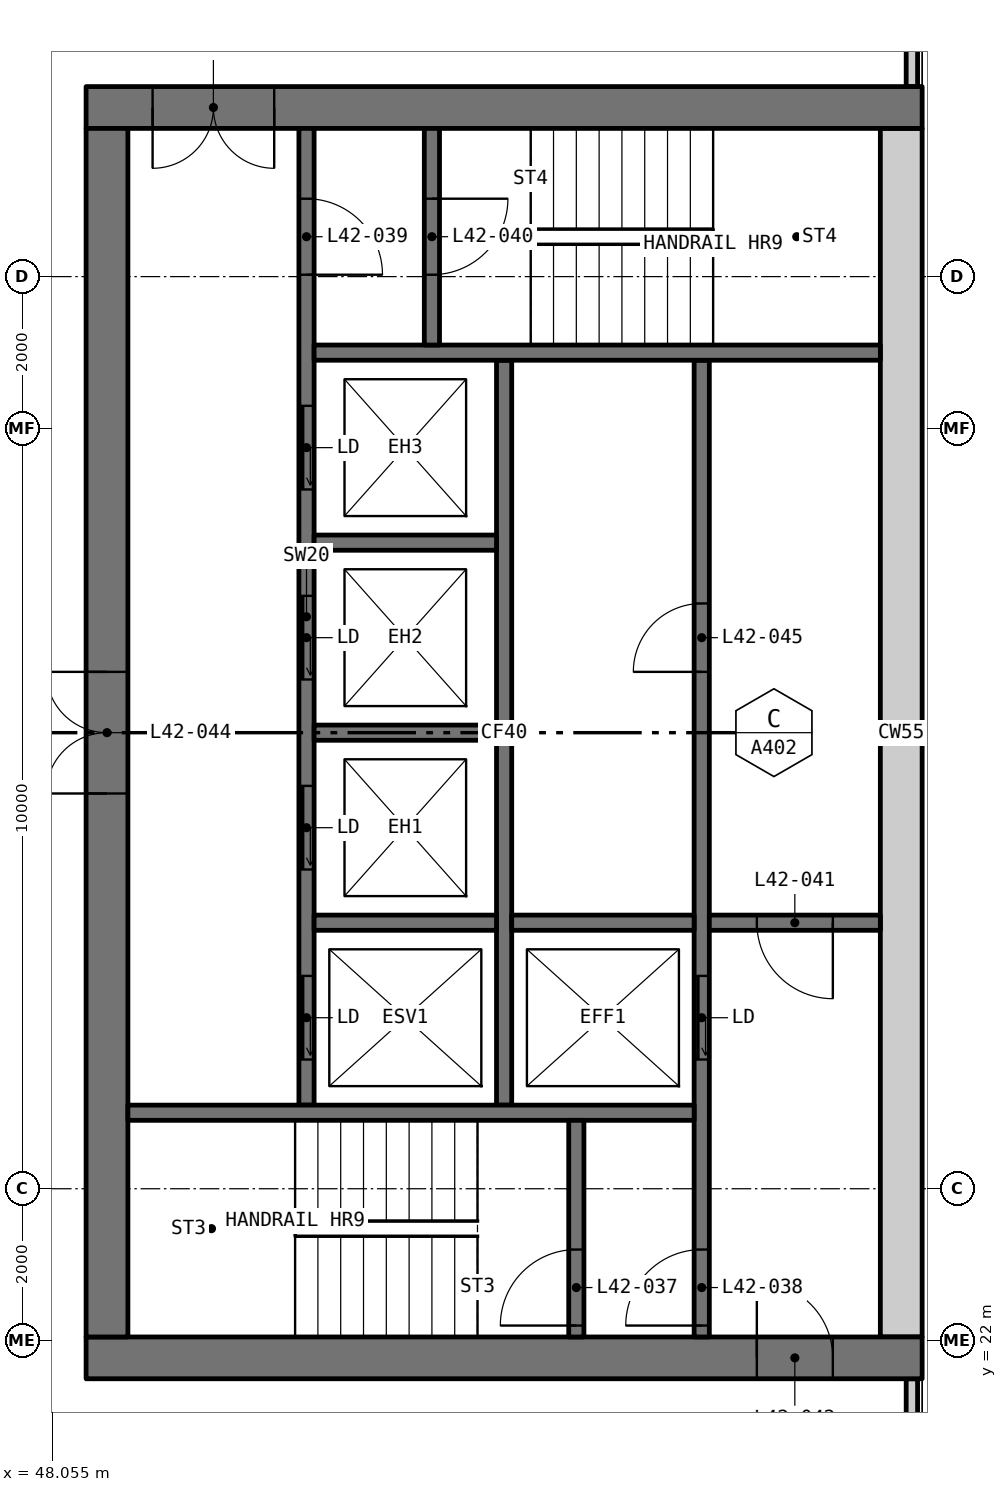
"""IFC4 building model, lengths in metres.
Left out: names, types, materials, properties, quantities, classifications, styles, units other than length and angle.
Written with IfcOpenShell. Run it as: python <this file> out.ifc"""

import sys

from ifc_helpers import new_model, si_unit, direction, frame, frame_2d, origin, place, context, subcontext, project, spatial, rectangle, extrude, element, fill, save


model = new_model("IFC4")
c1 = context("Model", 3, precision=1e-05, world=origin(), true_north=direction((0.0, 1.0)))
c2 = subcontext(c1, "Body", "Model", "MODEL_VIEW")
j1 = project(units=[si_unit("LENGTHUNIT", "METRE"), si_unit("PLANEANGLEUNIT", "RADIAN")], contexts=[c1])
p1 = place(None, origin())
s1 = spatial("IfcSite", under=j1, at=p1, CompositionType="ELEMENT")
p2 = place(p1, origin())
s2 = spatial("IfcBuilding", under=s1, at=p2, CompositionType="ELEMENT")
p3 = place(p2, frame((0.0, 0.0, 161.7)))
s3 = spatial("IfcBuildingStorey", under=s2, at=p3, CompositionType="ELEMENT", Elevation=161.7)
for number, where, z_axis, x_axis in (
    (1, (59.365, 18.71, 0.0), (0.0, 0.0, 1.0), (0.0, 1.0, 0.0)),
    (2, (59.365, 38.5, 0.0), (0.0, 0.0, 1.0), (0.0, 1.0, 0.0)),
):
    element("IfcWall", number, at=place(p3, frame(where, z_axis=z_axis, x_axis=x_axis)), inside=s3, PredefinedType="ELEMENTEDWALL", context=c2, shape_type="SweptSolid", body=[
        extrude(rectangle(XDim=2.79, YDim=0.15, at=frame_2d((1.395, 0.0))), origin(), (0.0, 0.0, 1.0), 3.05),
    ])
p4 = place(p3, frame((59.5, 21.775, 0.0), z_axis=(0.0, 0.0, 1.0), x_axis=(-1.0, 0.0, 0.0)))
e3 = element("IfcWall", 3, at=p4, inside=s3, PredefinedType="SHEAR", context=c2, shape_type="SweptSolid", body=[
    extrude(rectangle(XDim=11.0, YDim=0.55, at=frame_2d((5.5, 0.0))), origin(), (0.0, 0.0, 1.0), 3.05),
])
p5 = place(p4, frame((1.175, 0.0, 0.0)))
e4 = element("IfcOpeningElement", 4, at=p5, cuts=e3, PredefinedType="OPENING", context=c2, shape_type="SweptSolid", body=[
    extrude(rectangle(XDim=1.0, YDim=2.1, at=frame_2d((0.5, 1.05))), frame((0.0, 0.285, 0.0), z_axis=(0.0, -1.0, 0.0), x_axis=(1.0, 0.0, 0.0)), (0.0, 0.0, 1.0), 0.57),
])
p6 = place(p3, frame((59.5, 38.225, 0.0), z_axis=(0.0, 0.0, 1.0), x_axis=(-1.0, 0.0, 0.0)))
e5 = element("IfcWall", 5, at=p6, inside=s3, PredefinedType="SHEAR", context=c2, shape_type="SweptSolid", body=[
    extrude(rectangle(XDim=11.0, YDim=0.55, at=frame_2d((5.5, 0.0))), origin(), (0.0, 0.0, 1.0), 3.05),
])
p7 = place(p6, frame((8.525, 0.0, 0.0)))
e6 = element("IfcOpeningElement", 6, at=p7, cuts=e5, PredefinedType="OPENING", context=c2, shape_type="SweptSolid", body=[
    extrude(rectangle(XDim=1.6, YDim=2.1, at=frame_2d((0.8, 1.05))), frame((0.0, 0.285, 0.0), z_axis=(0.0, -1.0, 0.0), x_axis=(1.0, 0.0, 0.0)), (0.0, 0.0, 1.0), 0.57),
])
p8 = place(p3, frame((59.225, 22.05, 0.0), z_axis=(0.0, 0.0, 1.0), x_axis=(0.0, 1.0, 0.0)))
e7 = element("IfcWall", 7, at=p8, inside=s3, PredefinedType="SHEAR", context=c2, shape_type="SweptSolid", body=[
    extrude(rectangle(XDim=15.9, YDim=0.55, at=frame_2d((7.95, 0.0))), origin(), (0.0, 0.0, 1.0), 3.05),
])
p9 = place(p3, frame((48.775, 22.05, 0.0), z_axis=(0.0, 0.0, 1.0), x_axis=(0.0, 1.0, 0.0)))
e8 = element("IfcWall", 8, at=p9, inside=s3, PredefinedType="SHEAR", context=c2, shape_type="SweptSolid", body=[
    extrude(rectangle(XDim=15.9, YDim=0.55, at=frame_2d((7.95, 0.0))), origin(), (0.0, 0.0, 1.0), 3.05),
])
p10 = place(p9, frame((7.15, 0.0, 0.0)))
e9 = element("IfcOpeningElement", 9, at=p10, cuts=e8, PredefinedType="OPENING", context=c2, shape_type="SweptSolid", body=[
    extrude(rectangle(XDim=1.6, YDim=2.1, at=frame_2d((0.8, 1.05))), frame((0.0, 0.285, 0.0), z_axis=(0.0, -1.0, 0.0), x_axis=(1.0, 0.0, 0.0)), (0.0, 0.0, 1.0), 0.57),
])
p11 = place(p3, frame((56.6, 22.05, 0.0), z_axis=(0.0, 0.0, 1.0), x_axis=(0.0, 1.0, 0.0)))
e10 = element("IfcWall", 10, at=p11, inside=s3, PredefinedType="SOLIDWALL", context=c2, shape_type="SweptSolid", body=[
    extrude(rectangle(XDim=12.85, YDim=0.2, at=frame_2d((6.425, 0.0))), origin(), (0.0, 0.0, 1.0), 3.05),
])
p12 = place(p11, frame((3.65, 0.0, 0.0)))
e11 = element("IfcOpeningElement", 11, at=p12, cuts=e10, PredefinedType="OPENING", context=c2, shape_type="SweptSolid", body=[
    extrude(rectangle(XDim=1.1, YDim=2.1, at=frame_2d((0.55, 1.05))), frame((0.0, 0.11, 0.0), z_axis=(0.0, -1.0, 0.0), x_axis=(1.0, 0.0, 0.0)), (0.0, 0.0, 1.0), 0.22),
])
p13 = place(p11, frame((0.15, 0.0, 0.0)))
e12 = element("IfcOpeningElement", 12, at=p13, cuts=e10, PredefinedType="OPENING", context=c2, shape_type="SweptSolid", body=[
    extrude(rectangle(XDim=1.0, YDim=2.1, at=frame_2d((0.5, 1.05))), frame((0.0, 0.11, 0.0), z_axis=(0.0, -1.0, 0.0), x_axis=(1.0, 0.0, 0.0)), (0.0, 0.0, 1.0), 0.22),
])
p14 = place(p11, frame((8.75, 0.0, 0.0)))
e13 = element("IfcOpeningElement", 13, at=p14, cuts=e10, PredefinedType="OPENING", context=c2, shape_type="SweptSolid", body=[
    extrude(rectangle(XDim=0.9, YDim=2.1, at=frame_2d((0.45, 1.05))), frame((0.0, 0.11, 0.0), z_axis=(0.0, -1.0, 0.0), x_axis=(1.0, 0.0, 0.0)), (0.0, 0.0, 1.0), 0.22),
])
p15 = place(p3, frame((51.4, 25.1, 0.0), z_axis=(0.0, 0.0, 1.0), x_axis=(0.0, 1.0, 0.0)))
e14 = element("IfcWall", 14, at=p15, inside=s3, PredefinedType="SOLIDWALL", context=c2, shape_type="SweptSolid", body=[
    extrude(rectangle(XDim=12.85, YDim=0.2, at=frame_2d((6.425, 0.0))), origin(), (0.0, 0.0, 1.0), 3.05),
])
p16 = place(p15, frame((0.6, 0.0, 0.0)))
e15 = element("IfcOpeningElement", 15, at=p16, cuts=e14, PredefinedType="OPENING", context=c2, shape_type="SweptSolid", body=[
    extrude(rectangle(XDim=1.1, YDim=2.1, at=frame_2d((0.55, 1.05))), frame((0.0, 0.11, 0.0), z_axis=(0.0, -1.0, 0.0), x_axis=(1.0, 0.0, 0.0)), (0.0, 0.0, 1.0), 0.22),
])
p17 = place(p15, frame((3.1, 0.0, 0.0)))
e16 = element("IfcOpeningElement", 16, at=p17, cuts=e14, PredefinedType="OPENING", context=c2, shape_type="SweptSolid", body=[
    extrude(rectangle(XDim=1.1, YDim=2.1, at=frame_2d((0.55, 1.05))), frame((0.0, 0.11, 0.0), z_axis=(0.0, -1.0, 0.0), x_axis=(1.0, 0.0, 0.0)), (0.0, 0.0, 1.0), 0.22),
])
p18 = place(p15, frame((5.6, 0.0, 0.0)))
e17 = element("IfcOpeningElement", 17, at=p18, cuts=e14, PredefinedType="OPENING", context=c2, shape_type="SweptSolid", body=[
    extrude(rectangle(XDim=1.1, YDim=2.1, at=frame_2d((0.55, 1.05))), frame((0.0, 0.11, 0.0), z_axis=(0.0, -1.0, 0.0), x_axis=(1.0, 0.0, 0.0)), (0.0, 0.0, 1.0), 0.22),
])
p19 = place(p15, frame((8.1, 0.0, 0.0)))
e18 = element("IfcOpeningElement", 18, at=p19, cuts=e14, PredefinedType="OPENING", context=c2, shape_type="SweptSolid", body=[
    extrude(rectangle(XDim=1.1, YDim=2.1, at=frame_2d((0.55, 1.05))), frame((0.0, 0.11, 0.0), z_axis=(0.0, -1.0, 0.0), x_axis=(1.0, 0.0, 0.0)), (0.0, 0.0, 1.0), 0.22),
])
p20 = place(p15, frame((10.925, 0.0, 0.0)))
e19 = element("IfcOpeningElement", 19, at=p20, cuts=e14, PredefinedType="OPENING", context=c2, shape_type="SweptSolid", body=[
    extrude(rectangle(XDim=1.0, YDim=2.1, at=frame_2d((0.5, 1.05))), frame((0.0, 0.11, 0.0), z_axis=(0.0, -1.0, 0.0), x_axis=(1.0, 0.0, 0.0)), (0.0, 0.0, 1.0), 0.22),
])
p21 = place(p3, frame((54.0, 25.1, 0.0), z_axis=(0.0, 0.0, 1.0), x_axis=(0.0, 1.0, 0.0)))
e20 = element("IfcWall", 20, at=p21, inside=s3, PredefinedType="SOLIDWALL", context=c2, shape_type="SweptSolid", body=[
    extrude(rectangle(XDim=9.8, YDim=0.2, at=frame_2d((4.9, 0.0))), origin(), (0.0, 0.0, 1.0), 3.05),
])
for number, where, z_axis, x_axis in (
    (21, (56.5, 25.0, 0.0), (0.0, 0.0, 1.0), (-1.0, 0.0, 0.0)),
    (22, (58.95, 35.0, 0.0), (0.0, 0.0, 1.0), (-1.0, 0.0, 0.0)),
):
    element("IfcWall", number, at=place(p3, frame(where, z_axis=z_axis, x_axis=x_axis)), inside=s3, PredefinedType="SOLIDWALL", context=c2, shape_type="SweptSolid", body=[
        extrude(rectangle(XDim=7.45, YDim=0.2, at=frame_2d((3.725, 0.0))), origin(), (0.0, 0.0, 1.0), 3.05),
    ])
p22 = place(p3, frame((58.95, 27.5, 0.0), z_axis=(0.0, 0.0, 1.0), x_axis=(-1.0, 0.0, 0.0)))
e23 = element("IfcWall", 23, at=p22, inside=s3, PredefinedType="SOLIDWALL", context=c2, shape_type="SweptSolid", body=[
    extrude(rectangle(XDim=2.25, YDim=0.2, at=frame_2d((1.125, 0.0))), origin(), (0.0, 0.0, 1.0), 3.05),
])
p23 = place(p22, frame((0.625, 0.0, 0.0)))
e24 = element("IfcOpeningElement", 24, at=p23, cuts=e23, PredefinedType="OPENING", context=c2, shape_type="SweptSolid", body=[
    extrude(rectangle(XDim=1.0, YDim=2.1, at=frame_2d((0.5, 1.05))), frame((0.0, 0.11, 0.0), z_axis=(0.0, -1.0, 0.0), x_axis=(1.0, 0.0, 0.0)), (0.0, 0.0, 1.0), 0.22),
])
p24 = place(p3, frame((54.95, 22.05, 0.0), z_axis=(0.0, 0.0, 1.0), x_axis=(0.0, 1.0, 0.0)))
e25 = element("IfcWall", 25, at=p24, inside=s3, PredefinedType="SOLIDWALL", context=c2, shape_type="SweptSolid", body=[
    extrude(rectangle(XDim=2.85, YDim=0.2, at=frame_2d((1.425, 0.0))), origin(), (0.0, 0.0, 1.0), 3.05),
])
p25 = place(p24, frame((0.15, 0.0, 0.0)))
e26 = element("IfcOpeningElement", 26, at=p25, cuts=e25, PredefinedType="OPENING", context=c2, shape_type="SweptSolid", body=[
    extrude(rectangle(XDim=1.0, YDim=2.1, at=frame_2d((0.5, 1.05))), frame((0.0, 0.11, 0.0), z_axis=(0.0, -1.0, 0.0), x_axis=(1.0, 0.0, 0.0)), (0.0, 0.0, 1.0), 0.22),
])
p26 = place(p3, frame((53.05, 35.1, 0.0), z_axis=(0.0, 0.0, 1.0), x_axis=(0.0, 1.0, 0.0)))
e27 = element("IfcWall", 27, at=p26, inside=s3, PredefinedType="SOLIDWALL", context=c2, shape_type="SweptSolid", body=[
    extrude(rectangle(XDim=2.85, YDim=0.2, at=frame_2d((1.425, 0.0))), origin(), (0.0, 0.0, 1.0), 3.05),
])
p27 = place(p26, frame((0.925, 0.0, 0.0)))
e28 = element("IfcOpeningElement", 28, at=p27, cuts=e27, PredefinedType="OPENING", context=c2, shape_type="SweptSolid", body=[
    extrude(rectangle(XDim=1.0, YDim=2.1, at=frame_2d((0.5, 1.05))), frame((0.0, 0.11, 0.0), z_axis=(0.0, -1.0, 0.0), x_axis=(1.0, 0.0, 0.0)), (0.0, 0.0, 1.0), 0.22),
])
for number, where, z_axis, x_axis in (
    (29, (56.5, 27.5, 0.0), (0.0, 0.0, 1.0), (-1.0, 0.0, 0.0)),
    (30, (53.9, 27.5, 0.0), (0.0, 0.0, 1.0), (-1.0, 0.0, 0.0)),
    (31, (53.9, 30.0, 0.0), (0.0, 0.0, 1.0), (-1.0, 0.0, 0.0)),
    (32, (53.9, 32.5, 0.0), (0.0, 0.0, 1.0), (-1.0, 0.0, 0.0)),
):
    element("IfcWall", number, at=place(p3, frame(where, z_axis=z_axis, x_axis=x_axis)), inside=s3, PredefinedType="SOLIDWALL", context=c2, shape_type="SweptSolid", body=[
        extrude(rectangle(XDim=2.4, YDim=0.2, at=frame_2d((1.2, 0.0))), origin(), (0.0, 0.0, 1.0), 3.05),
    ])
p28 = place(p16, origin())
e33 = element("IfcDoor", 33, at=p28, inside=s3, OperationType="SLIDING_TO_LEFT", PredefinedType="DOOR", context=c2, shape_type="SweptSolid", body=[
    extrude(rectangle(XDim=1.1, YDim=2.1, at=frame_2d((0.55, 1.05))), frame((0.0, 0.025, 0.0), z_axis=(0.0, -1.0, 0.0), x_axis=(1.0, 0.0, 0.0)), (0.0, 0.0, 1.0), 0.05),
])
fill(e15, e33)
p29 = place(p17, origin())
e34 = element("IfcDoor", 34, at=p29, inside=s3, OperationType="SLIDING_TO_LEFT", PredefinedType="DOOR", context=c2, shape_type="SweptSolid", body=[
    extrude(rectangle(XDim=1.1, YDim=2.1, at=frame_2d((0.55, 1.05))), frame((0.0, 0.025, 0.0), z_axis=(0.0, -1.0, 0.0), x_axis=(1.0, 0.0, 0.0)), (0.0, 0.0, 1.0), 0.05),
])
fill(e16, e34)
p30 = place(p18, origin())
e35 = element("IfcDoor", 35, at=p30, inside=s3, OperationType="SLIDING_TO_LEFT", PredefinedType="DOOR", context=c2, shape_type="SweptSolid", body=[
    extrude(rectangle(XDim=1.1, YDim=2.1, at=frame_2d((0.55, 1.05))), frame((0.0, 0.025, 0.0), z_axis=(0.0, -1.0, 0.0), x_axis=(1.0, 0.0, 0.0)), (0.0, 0.0, 1.0), 0.05),
])
fill(e17, e35)
p31 = place(p19, origin())
e36 = element("IfcDoor", 36, at=p31, inside=s3, OperationType="SLIDING_TO_LEFT", PredefinedType="DOOR", context=c2, shape_type="SweptSolid", body=[
    extrude(rectangle(XDim=1.1, YDim=2.1, at=frame_2d((0.55, 1.05))), frame((0.0, 0.025, 0.0), z_axis=(0.0, -1.0, 0.0), x_axis=(1.0, 0.0, 0.0)), (0.0, 0.0, 1.0), 0.05),
])
fill(e18, e36)
p32 = place(p12, origin())
e37 = element("IfcDoor", 37, at=p32, inside=s3, OperationType="SLIDING_TO_LEFT", PredefinedType="DOOR", context=c2, shape_type="SweptSolid", body=[
    extrude(rectangle(XDim=1.1, YDim=2.1, at=frame_2d((0.55, 1.05))), frame((0.0, 0.025, 0.0), z_axis=(0.0, -1.0, 0.0), x_axis=(1.0, 0.0, 0.0)), (0.0, 0.0, 1.0), 0.05),
])
fill(e11, e37)
p33 = place(p25, origin())
e38 = element("IfcDoor", 38, at=p33, inside=s3, OperationType="SINGLE_SWING_RIGHT", PredefinedType="DOOR", context=c2, shape_type="SweptSolid", body=[
    extrude(rectangle(XDim=1.0, YDim=2.1, at=frame_2d((0.5, 1.05))), frame((0.0, 0.025, 0.0), z_axis=(0.0, -1.0, 0.0), x_axis=(1.0, 0.0, 0.0)), (0.0, 0.0, 1.0), 0.05),
])
fill(e26, e38)
p34 = place(p13, origin())
e39 = element("IfcDoor", 39, at=p34, inside=s3, OperationType="SINGLE_SWING_RIGHT", PredefinedType="DOOR", context=c2, shape_type="SweptSolid", body=[
    extrude(rectangle(XDim=1.0, YDim=2.1, at=frame_2d((0.5, 1.05))), frame((0.0, 0.025, 0.0), z_axis=(0.0, -1.0, 0.0), x_axis=(1.0, 0.0, 0.0)), (0.0, 0.0, 1.0), 0.05),
])
fill(e12, e39)
p35 = place(p20, frame((1.0, 0.0, 0.0), x_axis=(-1.0, 0.0, 0.0)))
e40 = element("IfcDoor", 40, at=p35, inside=s3, OperationType="SINGLE_SWING_LEFT", PredefinedType="DOOR", context=c2, shape_type="SweptSolid", body=[
    extrude(rectangle(XDim=1.0, YDim=2.1, at=frame_2d((0.5, 1.05))), frame((0.0, 0.025, 0.0), z_axis=(0.0, -1.0, 0.0), x_axis=(1.0, 0.0, 0.0)), (0.0, 0.0, 1.0), 0.05),
])
fill(e19, e40)
p36 = place(p27, frame((1.0, 0.0, 0.0), x_axis=(-1.0, 0.0, 0.0)))
e41 = element("IfcDoor", 41, at=p36, inside=s3, OperationType="SINGLE_SWING_RIGHT", PredefinedType="DOOR", context=c2, shape_type="SweptSolid", body=[
    extrude(rectangle(XDim=1.0, YDim=2.1, at=frame_2d((0.5, 1.05))), frame((0.0, 0.025, 0.0), z_axis=(0.0, -1.0, 0.0), x_axis=(1.0, 0.0, 0.0)), (0.0, 0.0, 1.0), 0.05),
])
fill(e28, e41)
p37 = place(p23, origin())
e42 = element("IfcDoor", 42, at=p37, inside=s3, OperationType="SINGLE_SWING_RIGHT", PredefinedType="DOOR", context=c2, shape_type="SweptSolid", body=[
    extrude(rectangle(XDim=1.0, YDim=2.1, at=frame_2d((0.5, 1.05))), frame((0.0, 0.025, 0.0), z_axis=(0.0, -1.0, 0.0), x_axis=(1.0, 0.0, 0.0)), (0.0, 0.0, 1.0), 0.05),
])
fill(e24, e42)
p38 = place(p5, frame((1.0, 0.0, 0.0), x_axis=(-1.0, 0.0, 0.0)))
e43 = element("IfcDoor", 43, at=p38, inside=s3, OperationType="SINGLE_SWING_RIGHT", PredefinedType="DOOR", context=c2, shape_type="SweptSolid", body=[
    extrude(rectangle(XDim=1.0, YDim=2.1, at=frame_2d((0.5, 1.05))), frame((0.0, 0.025, 0.0), z_axis=(0.0, -1.0, 0.0), x_axis=(1.0, 0.0, 0.0)), (0.0, 0.0, 1.0), 0.05),
])
fill(e4, e43)
p39 = place(p7, origin())
e44 = element("IfcDoor", 44, at=p39, inside=s3, OperationType="DOUBLE_DOOR_SINGLE_SWING", PredefinedType="DOOR", context=c2, shape_type="SweptSolid", body=[
    extrude(rectangle(XDim=1.6, YDim=2.1, at=frame_2d((0.8, 1.05))), frame((0.0, 0.025, 0.0), z_axis=(0.0, -1.0, 0.0), x_axis=(1.0, 0.0, 0.0)), (0.0, 0.0, 1.0), 0.05),
])
fill(e6, e44)
p40 = place(p10, origin())
e45 = element("IfcDoor", 45, at=p40, inside=s3, OperationType="DOUBLE_DOOR_SINGLE_SWING", PredefinedType="DOOR", context=c2, shape_type="SweptSolid", body=[
    extrude(rectangle(XDim=1.6, YDim=2.1, at=frame_2d((0.8, 1.05))), frame((0.0, 0.025, 0.0), z_axis=(0.0, -1.0, 0.0), x_axis=(1.0, 0.0, 0.0)), (0.0, 0.0, 1.0), 0.05),
])
fill(e9, e45)
p41 = place(p14, origin())
e46 = element("IfcDoor", 46, at=p41, inside=s3, OperationType="SINGLE_SWING_RIGHT", PredefinedType="DOOR", context=c2, shape_type="SweptSolid", body=[
    extrude(rectangle(XDim=0.9, YDim=2.1, at=frame_2d((0.45, 1.05))), frame((0.0, 0.025, 0.0), z_axis=(0.0, -1.0, 0.0), x_axis=(1.0, 0.0, 0.0)), (0.0, 0.0, 1.0), 0.05),
])
fill(e13, e46)
save(model, sys.argv[1])
